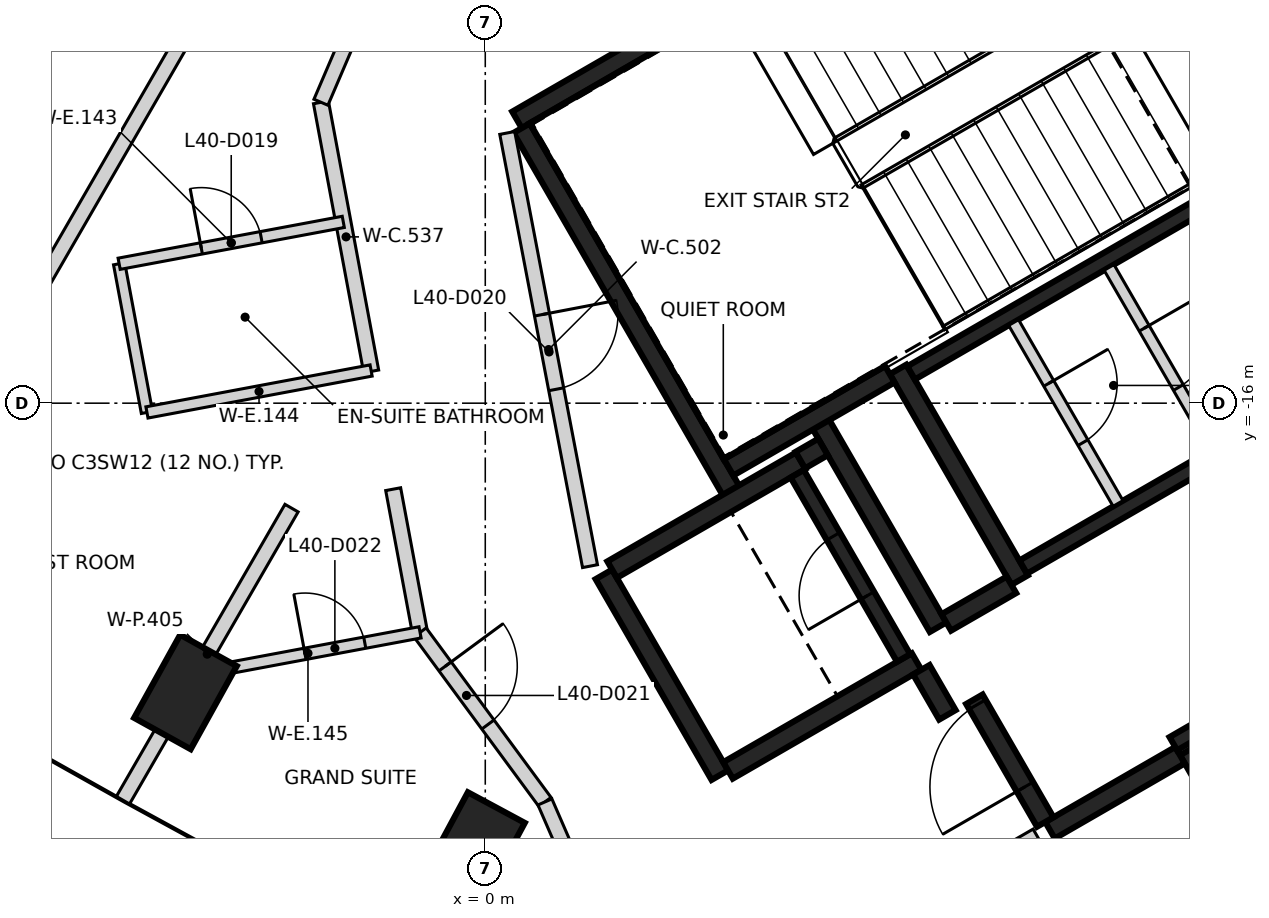
"""IFC4 building model, lengths in metres.
Left out: names, types, materials, properties, quantities, classifications, styles, units other than length and angle.
Written with IfcOpenShell. Run it as: python <this file> out.ifc"""

import sys

from ifc_helpers import new_model, si_unit, direction, frame, frame_2d, origin, origin_2d, place, context, subcontext, project, spatial, rectangle, extrude, element, fill, save


model = new_model("IFC4")
c1 = context("Model", 3, precision=1e-05, world=origin(), true_north=direction((0.0, 1.0)))
c2 = subcontext(c1, "Body", "Model", "MODEL_VIEW")
j1 = project(units=[si_unit("LENGTHUNIT", "METRE"), si_unit("PLANEANGLEUNIT", "RADIAN")], contexts=[c1])
p1 = place(None, origin())
s1 = spatial("IfcSite", under=j1, at=p1, CompositionType="ELEMENT")
p2 = place(p1, origin())
s2 = spatial("IfcBuilding", under=s1, at=p2, CompositionType="ELEMENT")
p3 = place(p2, frame((0.0, 0.0, 161.2)))
s3 = spatial("IfcBuildingStorey", under=s2, at=p3, CompositionType="ELEMENT", Elevation=161.2)
for number, where, z_axis, x_axis in (
    (1, (-3.945, -19.8, -0.4), (0.0, 0.0, 1.0), (0.485, 0.875, 0.0)),
    (2, (-0.151, -21.871, -0.4), (0.0, 0.0, 1.0), (0.474, 0.881, 0.0)),
):
    element("IfcColumn", number, at=place(p3, frame(where, z_axis=z_axis, x_axis=x_axis)), inside=s3, PredefinedType="COLUMN", context=c2, shape_type="SweptSolid", body=[
        extrude(rectangle(XDim=1.25, YDim=0.85, at=origin_2d()), origin(), (0.0, 0.0, 1.0), 2.884),
    ])
p4 = place(p3, frame((0.417, -12.273, 0.0), z_axis=(0.0, 0.0, 1.0), x_axis=(0.866021906294, 0.500006057782, 0.0)))
e3 = element("IfcWall", 3, at=p4, inside=s3, PredefinedType="SHEAR", context=c2, shape_type="SweptSolid", body=[
    extrude(rectangle(XDim=11.55, YDim=0.25, at=frame_2d((5.775, 0.0))), origin(), (0.0, 0.0, 1.0), 3.2),
])
p5 = place(p4, frame((10.025, 0.0, 0.0)))
e4 = element("IfcOpeningElement", 4, at=p5, cuts=e3, PredefinedType="OPENING", context=c2, shape_type="SweptSolid", body=[
    extrude(rectangle(XDim=1.2, YDim=2.1, at=frame_2d((0.6, 1.05))), frame((0.0, 0.135, 0.0), z_axis=(0.0, -1.0, 0.0), x_axis=(1.0, 0.0, 0.0)), (0.0, 0.0, 1.0), 0.27),
])
p6 = place(p4, frame((8.725, 0.0, 0.0)))
e5 = element("IfcOpeningElement", 5, at=p6, cuts=e3, PredefinedType="OPENING", context=c2, shape_type="SweptSolid", body=[
    extrude(rectangle(XDim=1.2, YDim=2.1, at=frame_2d((0.6, 1.05))), frame((0.0, 0.135, 0.0), z_axis=(0.0, -1.0, 0.0), x_axis=(1.0, 0.0, 0.0)), (0.0, 0.0, 1.0), 0.27),
])
p7 = place(p3, frame((3.235, -17.153, 0.0), z_axis=(0.0, 0.0, 1.0), x_axis=(-0.500008851346, 0.866020293397, 0.0)))
e6 = element("IfcWall", 6, at=p7, inside=s3, PredefinedType="SHEAR", context=c2, shape_type="SweptSolid", body=[
    extrude(rectangle(XDim=5.51, YDim=0.25, at=frame_2d((2.755, 0.0))), origin(), (0.0, 0.0, 1.0), 3.2),
])
p8 = place(p3, frame((7.031, -18.327, 0.0), z_axis=(0.0, 0.0, 1.0), x_axis=(-0.499971222258, 0.866042017984, 0.0)))
e7 = element("IfcWall", 7, at=p8, inside=s3, PredefinedType="SHEAR", context=c2, shape_type="SweptSolid", body=[
    extrude(rectangle(XDim=3.2, YDim=0.25, at=frame_2d((1.6, 0.0))), origin(), (0.0, 0.0, 1.0), 3.2),
])
p9 = place(p3, frame((10.736, -23.145, 0.0), z_axis=(0.0, 0.0, 1.0), x_axis=(-0.500023226632, 0.866011993467, 0.0)))
e8 = element("IfcWall", 8, at=p9, inside=s3, PredefinedType="SHEAR", context=c2, shape_type="SweptSolid", body=[
    extrude(rectangle(XDim=2.974, YDim=0.25, at=frame_2d((1.487, 0.0))), origin(), (0.0, 0.0, 1.0), 3.2),
])
p10 = place(p3, frame((3.085, -20.894, 0.0), z_axis=(0.0, 0.0, 1.0), x_axis=(-0.499978833458, 0.866037623948, 0.0)))
e9 = element("IfcWall", 9, at=p10, inside=s3, PredefinedType="SHEAR", context=c2, shape_type="SweptSolid", body=[
    extrude(rectangle(XDim=3.05, YDim=0.25, at=frame_2d((1.525, 0.0))), origin(), (0.0, 0.0, 1.0), 3.2),
])
p11 = place(p3, frame((1.669, -18.19, 0.0), z_axis=(0.0, 0.0, 1.0), x_axis=(0.866042235819, 0.499970844928, 0.0)))
e10 = element("IfcWall", 10, at=p11, inside=s3, PredefinedType="SHEAR", context=c2, shape_type="SweptSolid", body=[
    extrude(rectangle(XDim=2.865, YDim=0.25, at=frame_2d((1.432, 0.0))), origin(), (0.0, 0.0, 1.0), 3.2),
])
p12 = place(p3, frame((5.675, -19.399, 0.0), z_axis=(0.0, 0.0, 1.0), x_axis=(-0.866026637627, -0.499997862916, 0.0)))
e11 = element("IfcWall", 11, at=p12, inside=s3, PredefinedType="SHEAR", context=c2, shape_type="SweptSolid", body=[
    extrude(rectangle(XDim=2.865, YDim=0.25, at=frame_2d((1.432, 0.0))), origin(), (0.0, 0.0, 1.0), 3.2),
])
p13 = place(p3, frame((4.414, -16.276, 0.0), z_axis=(0.0, 0.0, 1.0), x_axis=(0.500003324108, -0.866023484601, 0.0)))
e12 = element("IfcWall", 12, at=p13, inside=s3, PredefinedType="SHEAR", context=c2, shape_type="SweptSolid", body=[
    extrude(rectangle(XDim=3.085, YDim=0.25, at=frame_2d((1.542, 0.0))), origin(), (0.0, 0.0, 1.0), 3.2),
])
p14 = place(p3, frame((5.322, -15.619, 0.0), z_axis=(0.0, 0.0, 1.0), x_axis=(-0.866026229868, -0.499998569178, 0.0)))
e13 = element("IfcWall", 13, at=p14, inside=s3, PredefinedType="SHEAR", context=c2, shape_type="SweptSolid", body=[
    extrude(rectangle(XDim=2.449, YDim=0.25, at=frame_2d((1.225, 0.0))), origin(), (0.0, 0.0, 1.0), 3.2),
])
p15 = place(p3, frame((9.14, -20.631, 0.0), z_axis=(0.0, 0.0, 1.0), x_axis=(-0.866043531843, -0.499968599967, 0.0)))
e14 = element("IfcWall", 14, at=p15, inside=s3, PredefinedType="SHEAR", context=c2, shape_type="SweptSolid", body=[
    extrude(rectangle(XDim=1.975, YDim=0.25, at=frame_2d((0.987, 0.0))), origin(), (0.0, 0.0, 1.0), 3.2),
])
p16 = place(p3, frame((7.367, -21.51, 0.0), z_axis=(0.0, 0.0, 1.0), x_axis=(-0.499983108224, 0.866035156036, 0.0)))
e15 = element("IfcWall", 15, at=p16, inside=s3, PredefinedType="SHEAR", context=c2, shape_type="SweptSolid", body=[
    extrude(rectangle(XDim=1.865, YDim=0.25, at=frame_2d((0.932, 0.0))), origin(), (0.0, 0.0, 1.0), 3.2),
])
p17 = place(p16, frame((0.535, 0.0, 0.0)))
e16 = element("IfcOpeningElement", 16, at=p17, cuts=e15, PredefinedType="OPENING", context=c2, shape_type="SweptSolid", body=[
    extrude(rectangle(XDim=1.25, YDim=2.1, at=frame_2d((0.625, 1.05))), frame((0.0, 0.135, 0.0), z_axis=(0.0, -1.0, 0.0), x_axis=(1.0, 0.0, 0.0)), (0.0, 0.0, 1.0), 0.27),
])
p18 = place(p3, frame((6.065, -18.885, 0.0), z_axis=(0.0, 0.0, 1.0), x_axis=(0.866017078145, 0.500014420154, 0.0)))
e17 = element("IfcWall", 17, at=p18, inside=s3, PredefinedType="SHEAR", context=c2, shape_type="SweptSolid", body=[
    extrude(rectangle(XDim=0.989, YDim=0.25, at=frame_2d((0.495, 0.0))), origin(), (0.0, 0.0, 1.0), 3.2),
])
p19 = place(p3, frame((6.08, -20.1, 0.0), z_axis=(0.0, 0.0, 1.0), x_axis=(-0.500051773299, 0.865995510393, 0.0)))
e18 = element("IfcWall", 18, at=p19, inside=s3, PredefinedType="SHEAR", context=c2, shape_type="SweptSolid", body=[
    extrude(rectangle(XDim=0.685, YDim=0.25, at=frame_2d((0.342, 0.0))), origin(), (0.0, 0.0, 1.0), 3.2),
])
p20 = place(p3, frame((4.145, -16.749, 0.0), z_axis=(0.0, 0.0, 1.0), x_axis=(0.866185586049, 0.49972245349, 0.0)))
e19 = element("IfcWall", 19, at=p20, inside=s3, PredefinedType="SHEAR", context=c2, shape_type="SweptSolid", body=[
    extrude(rectangle(XDim=0.344, YDim=0.25, at=frame_2d((0.172, 0.0))), origin(), (0.0, 0.0, 1.0), 3.2),
])
p21 = place(p3, frame((9.052, -20.48, 0.0), z_axis=(0.0, 0.0, 1.0), x_axis=(0.866030299012, 0.499991521122, 0.0)))
e20 = element("IfcWall", 20, at=p21, inside=s3, PredefinedType="SHEAR", context=c2, shape_type="SweptSolid", body=[
    extrude(rectangle(XDim=6.1, YDim=0.2, at=frame_2d((3.05, 0.0))), origin(), (0.0, 0.0, 1.0), 3.2),
])
p22 = place(p21, frame((1.0, 0.0, 0.0)))
e21 = element("IfcOpeningElement", 21, at=p22, cuts=e20, PredefinedType="OPENING", context=c2, shape_type="SweptSolid", body=[
    extrude(rectangle(XDim=1.2, YDim=2.1, at=frame_2d((0.6, 1.05))), frame((0.0, 0.11, 0.0), z_axis=(0.0, -1.0, 0.0), x_axis=(1.0, 0.0, 0.0)), (0.0, 0.0, 1.0), 0.22),
])
p23 = place(p21, frame((4.05, 0.0, 0.0)))
e22 = element("IfcOpeningElement", 22, at=p23, cuts=e20, PredefinedType="OPENING", context=c2, shape_type="SweptSolid", body=[
    extrude(rectangle(XDim=1.2, YDim=2.1, at=frame_2d((0.6, 1.05))), frame((0.0, 0.11, 0.0), z_axis=(0.0, -1.0, 0.0), x_axis=(1.0, 0.0, 0.0)), (0.0, 0.0, 1.0), 0.22),
])
p24 = place(p3, frame((10.538, -12.752, 0.0), z_axis=(0.0, 0.0, 1.0), x_axis=(-0.866038630372, -0.499977090179, 0.0)))
e23 = element("IfcWall", 23, at=p24, inside=s3, PredefinedType="SHEAR", context=c2, shape_type="SweptSolid", body=[
    extrude(rectangle(XDim=5.699, YDim=0.2, at=frame_2d((2.85, 0.0))), origin(), (0.0, 0.0, 1.0), 3.2),
])
p25 = place(p3, frame((7.077, -18.156, 0.0), z_axis=(0.0, 0.0, 1.0), x_axis=(0.866038630372, 0.499977090179, 0.0)))
e24 = element("IfcWall", 24, at=p25, inside=s3, PredefinedType="SHEAR", context=c2, shape_type="SweptSolid", body=[
    extrude(rectangle(XDim=5.699, YDim=0.2, at=frame_2d((2.85, 0.0))), origin(), (0.0, 0.0, 1.0), 3.2),
])
p26 = place(p25, frame((3.224, 0.0, 0.0)))
e25 = element("IfcOpeningElement", 25, at=p26, cuts=e24, PredefinedType="OPENING", context=c2, shape_type="SweptSolid", body=[
    extrude(rectangle(XDim=0.9, YDim=2.1, at=frame_2d((0.45, 1.05))), frame((0.0, 0.11, 0.0), z_axis=(0.0, -1.0, 0.0), x_axis=(1.0, 0.0, 0.0)), (0.0, 0.0, 1.0), 0.22),
])
p27 = place(p25, frame((4.599, 0.0, 0.0)))
e26 = element("IfcOpeningElement", 26, at=p27, cuts=e24, PredefinedType="OPENING", context=c2, shape_type="SweptSolid", body=[
    extrude(rectangle(XDim=0.9, YDim=2.1, at=frame_2d((0.45, 1.05))), frame((0.0, 0.11, 0.0), z_axis=(0.0, -1.0, 0.0), x_axis=(1.0, 0.0, 0.0)), (0.0, 0.0, 1.0), 0.22),
])
p28 = place(p3, frame((7.906, -8.094, 0.0), z_axis=(0.0, 0.0, 1.0), x_axis=(0.500024287448, -0.866011380966, 0.0)))
e27 = element("IfcWall", 27, at=p28, inside=s3, PredefinedType="SHEAR", context=c2, shape_type="SweptSolid", body=[
    extrude(rectangle(XDim=5.251, YDim=0.2, at=frame_2d((2.625, 0.0))), origin(), (0.0, 0.0, 1.0), 3.2),
])
p29 = place(p28, frame((1.849, 0.0, 0.0)))
e28 = element("IfcOpeningElement", 28, at=p29, cuts=e27, PredefinedType="OPENING", context=c2, shape_type="SweptSolid", body=[
    extrude(rectangle(XDim=1.4, YDim=2.1, at=frame_2d((0.7, 1.05))), frame((0.0, 0.11, 0.0), z_axis=(0.0, -1.0, 0.0), x_axis=(1.0, 0.0, 0.0)), (0.0, 0.0, 1.0), 0.22),
])
p30 = place(p3, frame((5.503, -19.352, 0.0), z_axis=(0.0, 0.0, 1.0), x_axis=(-0.499986818241, 0.866033014143, 0.0)))
e29 = element("IfcWall", 29, at=p30, inside=s3, PredefinedType="SHEAR", context=c2, shape_type="SweptSolid", body=[
    extrude(rectangle(XDim=2.798, YDim=0.2, at=frame_2d((1.399, 0.0))), origin(), (0.0, 0.0, 1.0), 3.2),
])
p31 = place(p30, frame((0.949, 0.0, 0.0)))
e30 = element("IfcOpeningElement", 30, at=p31, cuts=e29, PredefinedType="OPENING", context=c2, shape_type="SweptSolid", body=[
    extrude(rectangle(XDim=0.9, YDim=2.1, at=frame_2d((0.45, 1.05))), frame((0.0, 0.11, 0.0), z_axis=(0.0, -1.0, 0.0), x_axis=(1.0, 0.0, 0.0)), (0.0, 0.0, 1.0), 0.22),
])
p32 = place(p3, frame((8.207, -14.214, 0.0), z_axis=(0.0, 0.0, 1.0), x_axis=(0.50002746344, -0.86600954718, 0.0)))
e31 = element("IfcWall", 31, at=p32, inside=s3, PredefinedType="PARTITIONING", context=c2, shape_type="SweptSolid", body=[
    extrude(rectangle(XDim=2.748, YDim=0.15, at=frame_2d((1.374, 0.0))), origin(), (0.0, 0.0, 1.0), 3.2),
])
p33 = place(p32, frame((0.924, 0.0, 0.0)))
e32 = element("IfcOpeningElement", 32, at=p33, cuts=e31, PredefinedType="OPENING", context=c2, shape_type="SweptSolid", body=[
    extrude(rectangle(XDim=0.9, YDim=2.1, at=frame_2d((0.45, 1.05))), frame((0.0, 0.085, 0.0), z_axis=(0.0, -1.0, 0.0), x_axis=(1.0, 0.0, 0.0)), (0.0, 0.0, 1.0), 0.17),
])
p34 = place(p3, frame((6.951, -14.939, 0.0), z_axis=(0.0, 0.0, 1.0), x_axis=(0.499988999718, -0.866031754707, 0.0)))
e33 = element("IfcWall", 33, at=p34, inside=s3, PredefinedType="PARTITIONING", context=c2, shape_type="SweptSolid", body=[
    extrude(rectangle(XDim=2.749, YDim=0.15, at=frame_2d((1.374, 0.0))), origin(), (0.0, 0.0, 1.0), 3.2),
])
p35 = place(p34, frame((0.924, 0.0, 0.0)))
e34 = element("IfcOpeningElement", 34, at=p35, cuts=e33, PredefinedType="OPENING", context=c2, shape_type="SweptSolid", body=[
    extrude(rectangle(XDim=0.9, YDim=2.1, at=frame_2d((0.45, 1.05))), frame((0.0, 0.085, 0.0), z_axis=(0.0, -1.0, 0.0), x_axis=(1.0, 0.0, 0.0)), (0.0, 0.0, 1.0), 0.17),
])
p36 = place(p3, frame((-2.162, -12.042, 0.0), z_axis=(0.0, 0.0, 1.0), x_axis=(0.183572226488, -0.983006224631, 0.0)))
e35 = element("IfcWall", 35, at=p36, inside=s3, PredefinedType="PARTITIONING", context=c2, shape_type="SweptSolid", body=[
    extrude(rectangle(XDim=3.602, YDim=0.2, at=frame_2d((1.801, 0.0))), origin(), (0.0, 0.0, 1.0), 3.2),
])
p37 = place(p3, frame((-2.162, -12.041, 0.0), z_axis=(0.0, 0.0, 1.0), x_axis=(0.393609042413, 0.919277934974, 0.0)))
e36 = element("IfcWall", 36, at=p37, inside=s3, PredefinedType="PARTITIONING", context=c2, shape_type="SweptSolid", body=[
    extrude(rectangle(XDim=1.52, YDim=0.2, at=frame_2d((0.76, 0.0))), origin(), (0.0, 0.0, 1.0), 3.2),
])
p38 = place(p3, frame((-1.212, -17.131, 0.0), z_axis=(0.0, 0.0, 1.0), x_axis=(0.183680924698, -0.982985919483, 0.0)))
e37 = element("IfcWall", 37, at=p38, inside=s3, PredefinedType="PARTITIONING", context=c2, shape_type="SweptSolid", body=[
    extrude(rectangle(XDim=1.917, YDim=0.2, at=frame_2d((0.958, 0.0))), origin(), (0.0, 0.0, 1.0), 3.2),
])
p39 = place(p3, frame((-0.858, -19.016, 0.0), z_axis=(0.0, 0.0, 1.0), x_axis=(0.593123867414, -0.805111220829, 0.0)))
e38 = element("IfcWall", 38, at=p39, inside=s3, PredefinedType="PARTITIONING", context=c2, shape_type="SweptSolid", body=[
    extrude(rectangle(XDim=2.77, YDim=0.2, at=frame_2d((1.385, 0.0))), origin(), (0.0, 0.0, 1.0), 3.2),
])
p40 = place(p39, frame((0.555, 0.0, 0.0)))
e39 = element("IfcOpeningElement", 39, at=p40, cuts=e38, PredefinedType="OPENING", context=c2, shape_type="SweptSolid", body=[
    extrude(rectangle(XDim=0.95, YDim=2.1, at=frame_2d((0.475, 1.05))), frame((0.0, 0.11, 0.0), z_axis=(0.0, -1.0, 0.0), x_axis=(1.0, 0.0, 0.0)), (0.0, 0.0, 1.0), 0.22),
])
p41 = place(p3, frame((0.289, -12.445, 0.0), z_axis=(0.0, 0.0, 1.0), x_axis=(0.187668946952, -0.982232338273, 0.0)))
e40 = element("IfcWall", 40, at=p41, inside=s3, PredefinedType="PARTITIONING", context=c2, shape_type="SweptSolid", body=[
    extrude(rectangle(XDim=5.802, YDim=0.2, at=frame_2d((2.901, 0.0))), origin(), (0.0, 0.0, 1.0), 3.2),
])
p42 = place(p41, frame((2.433, 0.0, 0.0)))
e41 = element("IfcOpeningElement", 41, at=p42, cuts=e40, PredefinedType="OPENING", context=c2, shape_type="SweptSolid", body=[
    extrude(rectangle(XDim=1.0, YDim=2.1, at=frame_2d((0.5, 1.05))), frame((0.0, 0.11, 0.0), z_axis=(0.0, -1.0, 0.0), x_axis=(1.0, 0.0, 0.0)), (0.0, 0.0, 1.0), 0.22),
])
p43 = place(p3, frame((0.785, -21.246, 0.0), z_axis=(0.0, 0.0, 1.0), x_axis=(0.398365586627, -0.917226721913, 0.0)))
e42 = element("IfcWall", 42, at=p43, inside=s3, PredefinedType="PARTITIONING", context=c2, shape_type="SweptSolid", body=[
    extrude(rectangle(XDim=2.006, YDim=0.2, at=frame_2d((1.003, 0.0))), origin(), (0.0, 0.0, 1.0), 2.484),
])
p44 = place(p3, frame((6.054, -22.385, 0.0), z_axis=(0.0, 0.0, 1.0), x_axis=(0.86593101922, 0.500163443238, 0.0)))
e43 = element("IfcWall", 43, at=p44, inside=s3, PredefinedType="PARTITIONING", context=c2, shape_type="SweptSolid", body=[
    extrude(rectangle(XDim=1.39, YDim=0.2, at=frame_2d((0.695, 0.0))), origin(), (0.0, 0.0, 1.0), 3.2),
])
p45 = place(p3, frame((-8.535, -19.107, 0.0), z_axis=(0.0, 0.0, 1.0), x_axis=(0.499987057201, 0.866032876184, 0.0)))
e44 = element("IfcWall", 44, at=p45, inside=s3, PredefinedType="PARTITIONING", context=c2, shape_type="SweptSolid", body=[
    extrude(rectangle(XDim=10.809, YDim=0.2, at=frame_2d((5.404, 0.0))), origin(), (0.0, 0.0, 1.0), 3.2),
])
p46 = place(p3, frame((-4.767, -21.223, 0.0), z_axis=(0.0, 0.0, 1.0), x_axis=(0.49992092869, 0.866071050814, 0.0)))
e45 = element("IfcWall", 45, at=p46, inside=s3, PredefinedType="PARTITIONING", context=c2, shape_type="SweptSolid", body=[
    extrude(rectangle(XDim=4.437, YDim=0.2, at=frame_2d((2.218, 0.0))), origin(), (0.0, 0.0, 1.0), 3.2),
])
p47 = place(p3, frame((-6.291, -11.392, 0.0), z_axis=(0.0, 0.0, 1.0), x_axis=(0.497409432693, 0.867515911248, 0.0)))
e46 = element("IfcWall", 46, at=p47, inside=s3, PredefinedType="PARTITIONING", context=c2, shape_type="SweptSolid", body=[
    extrude(rectangle(XDim=3.0, YDim=0.15, at=frame_2d((1.5, 0.0))), origin(), (0.0, 0.0, 1.0), 3.2),
])
p48 = place(p47, frame((1.1, 0.0, 0.0)))
e47 = element("IfcOpeningElement", 47, at=p48, cuts=e46, PredefinedType="OPENING", context=c2, shape_type="SweptSolid", body=[
    extrude(rectangle(XDim=0.8, YDim=2.1, at=frame_2d((0.4, 1.05))), frame((0.0, 0.085, 0.0), z_axis=(0.0, -1.0, 0.0), x_axis=(1.0, 0.0, 0.0)), (0.0, 0.0, 1.0), 0.17),
])
p49 = place(p3, frame((-4.817, -14.166, 0.0), z_axis=(0.0, 0.0, 1.0), x_axis=(0.183903339385, -0.982944332993, 0.0)))
e48 = element("IfcWall", 48, at=p49, inside=s3, PredefinedType="PARTITIONING", context=c2, shape_type="SweptSolid", body=[
    extrude(rectangle(XDim=1.99, YDim=0.15, at=frame_2d((0.995, 0.0))), origin(), (0.0, 0.0, 1.0), 3.2),
])
p50 = place(p3, frame((-4.817, -14.166, 0.0), z_axis=(0.0, 0.0, 1.0), x_axis=(0.982987155193, 0.183674311555, 0.0)))
e49 = element("IfcWall", 49, at=p50, inside=s3, PredefinedType="PARTITIONING", context=c2, shape_type="SweptSolid", body=[
    extrude(rectangle(XDim=3.0, YDim=0.15, at=frame_2d((1.5, 0.0))), origin(), (0.0, 0.0, 1.0), 3.2),
])
p51 = place(p50, frame((1.1, 0.0, 0.0)))
e50 = element("IfcOpeningElement", 50, at=p51, cuts=e49, PredefinedType="OPENING", context=c2, shape_type="SweptSolid", body=[
    extrude(rectangle(XDim=0.8, YDim=2.1, at=frame_2d((0.4, 1.05))), frame((0.0, 0.085, 0.0), z_axis=(0.0, -1.0, 0.0), x_axis=(1.0, 0.0, 0.0)), (0.0, 0.0, 1.0), 0.17),
])
p52 = place(p3, frame((-4.451, -16.122, 0.0), z_axis=(0.0, 0.0, 1.0), x_axis=(0.982928336035, 0.18398882091, 0.0)))
e51 = element("IfcWall", 51, at=p52, inside=s3, PredefinedType="PARTITIONING", context=c2, shape_type="SweptSolid", body=[
    extrude(rectangle(XDim=3.0, YDim=0.15, at=frame_2d((1.5, 0.0))), origin(), (0.0, 0.0, 1.0), 3.2),
])
p53 = place(p3, frame((-3.807, -19.566, 0.0), z_axis=(0.0, 0.0, 1.0), x_axis=(0.982987155193, 0.183674311555, 0.0)))
e52 = element("IfcWall", 52, at=p53, inside=s3, PredefinedType="PARTITIONING", context=c2, shape_type="SweptSolid", body=[
    extrude(rectangle(XDim=3.0, YDim=0.15, at=frame_2d((1.5, 0.0))), origin(), (0.0, 0.0, 1.0), 3.2),
])
p54 = place(p53, frame((1.46, 0.0, 0.0)))
e53 = element("IfcOpeningElement", 53, at=p54, cuts=e52, PredefinedType="OPENING", context=c2, shape_type="SweptSolid", body=[
    extrude(rectangle(XDim=0.8, YDim=2.1, at=frame_2d((0.4, 1.05))), frame((0.0, 0.085, 0.0), z_axis=(0.0, -1.0, 0.0), x_axis=(1.0, 0.0, 0.0)), (0.0, 0.0, 1.0), 0.17),
])
p55 = place(p17, origin())
e54 = element("IfcDoor", 54, at=p55, inside=s3, OperationType="SINGLE_SWING_LEFT", PredefinedType="DOOR", context=c2, shape_type="SweptSolid", body=[
    extrude(rectangle(XDim=1.25, YDim=2.1, at=frame_2d((0.625, 1.05))), frame((0.0, 0.025, 0.0), z_axis=(0.0, -1.0, 0.0), x_axis=(1.0, 0.0, 0.0)), (0.0, 0.0, 1.0), 0.05),
])
fill(e16, e54)
p56 = place(p31, origin())
e55 = element("IfcDoor", 55, at=p56, inside=s3, OperationType="SINGLE_SWING_LEFT", PredefinedType="DOOR", context=c2, shape_type="SweptSolid", body=[
    extrude(rectangle(XDim=0.9, YDim=2.1, at=frame_2d((0.45, 1.05))), frame((0.0, 0.025, 0.0), z_axis=(0.0, -1.0, 0.0), x_axis=(1.0, 0.0, 0.0)), (0.0, 0.0, 1.0), 0.05),
])
fill(e30, e55)
p57 = place(p33, origin())
e56 = element("IfcDoor", 56, at=p57, inside=s3, OperationType="SINGLE_SWING_RIGHT", PredefinedType="DOOR", context=c2, shape_type="SweptSolid", body=[
    extrude(rectangle(XDim=0.9, YDim=2.1, at=frame_2d((0.45, 1.05))), frame((0.0, 0.025, 0.0), z_axis=(0.0, -1.0, 0.0), x_axis=(1.0, 0.0, 0.0)), (0.0, 0.0, 1.0), 0.05),
])
fill(e32, e56)
p58 = place(p35, origin())
e57 = element("IfcDoor", 57, at=p58, inside=s3, OperationType="SINGLE_SWING_LEFT", PredefinedType="DOOR", context=c2, shape_type="SweptSolid", body=[
    extrude(rectangle(XDim=0.9, YDim=2.1, at=frame_2d((0.45, 1.05))), frame((0.0, 0.025, 0.0), z_axis=(0.0, -1.0, 0.0), x_axis=(1.0, 0.0, 0.0)), (0.0, 0.0, 1.0), 0.05),
])
fill(e34, e57)
p59 = place(p51, frame((0.8, 0.0, 0.0), z_axis=(0.0, 0.0, 1.0), x_axis=(-1.0, 0.0, 0.0)))
e58 = element("IfcDoor", 58, at=p59, inside=s3, OperationType="SINGLE_SWING_LEFT", PredefinedType="DOOR", context=c2, shape_type="SweptSolid", body=[
    extrude(rectangle(XDim=0.8, YDim=2.1, at=frame_2d((0.4, 1.05))), frame((0.0, 0.025, 0.0), z_axis=(0.0, -1.0, 0.0), x_axis=(1.0, 0.0, 0.0)), (0.0, 0.0, 1.0), 0.05),
])
fill(e50, e58)
p60 = place(p42, origin())
e59 = element("IfcDoor", 59, at=p60, inside=s3, OperationType="SINGLE_SWING_LEFT", PredefinedType="DOOR", context=c2, shape_type="SweptSolid", body=[
    extrude(rectangle(XDim=1.0, YDim=2.1, at=frame_2d((0.5, 1.05))), frame((0.0, 0.025, 0.0), z_axis=(0.0, -1.0, 0.0), x_axis=(1.0, 0.0, 0.0)), (0.0, 0.0, 1.0), 0.05),
])
fill(e41, e59)
p61 = place(p40, frame((0.95, 0.0, 0.0), z_axis=(0.0, 0.0, 1.0), x_axis=(-1.0, 0.0, 0.0)))
e60 = element("IfcDoor", 60, at=p61, inside=s3, OperationType="SINGLE_SWING_LEFT", PredefinedType="DOOR", context=c2, shape_type="SweptSolid", body=[
    extrude(rectangle(XDim=0.95, YDim=2.1, at=frame_2d((0.475, 1.05))), frame((0.0, 0.025, 0.0), z_axis=(0.0, -1.0, 0.0), x_axis=(1.0, 0.0, 0.0)), (0.0, 0.0, 1.0), 0.05),
])
fill(e39, e60)
p62 = place(p54, frame((0.8, 0.0, 0.0), z_axis=(0.0, 0.0, 1.0), x_axis=(-1.0, 0.0, 0.0)))
e61 = element("IfcDoor", 61, at=p62, inside=s3, OperationType="SINGLE_SWING_LEFT", PredefinedType="DOOR", context=c2, shape_type="SweptSolid", body=[
    extrude(rectangle(XDim=0.8, YDim=2.1, at=frame_2d((0.4, 1.05))), frame((0.0, 0.025, 0.0), z_axis=(0.0, -1.0, 0.0), x_axis=(1.0, 0.0, 0.0)), (0.0, 0.0, 1.0), 0.05),
])
fill(e53, e61)
save(model, sys.argv[1])
